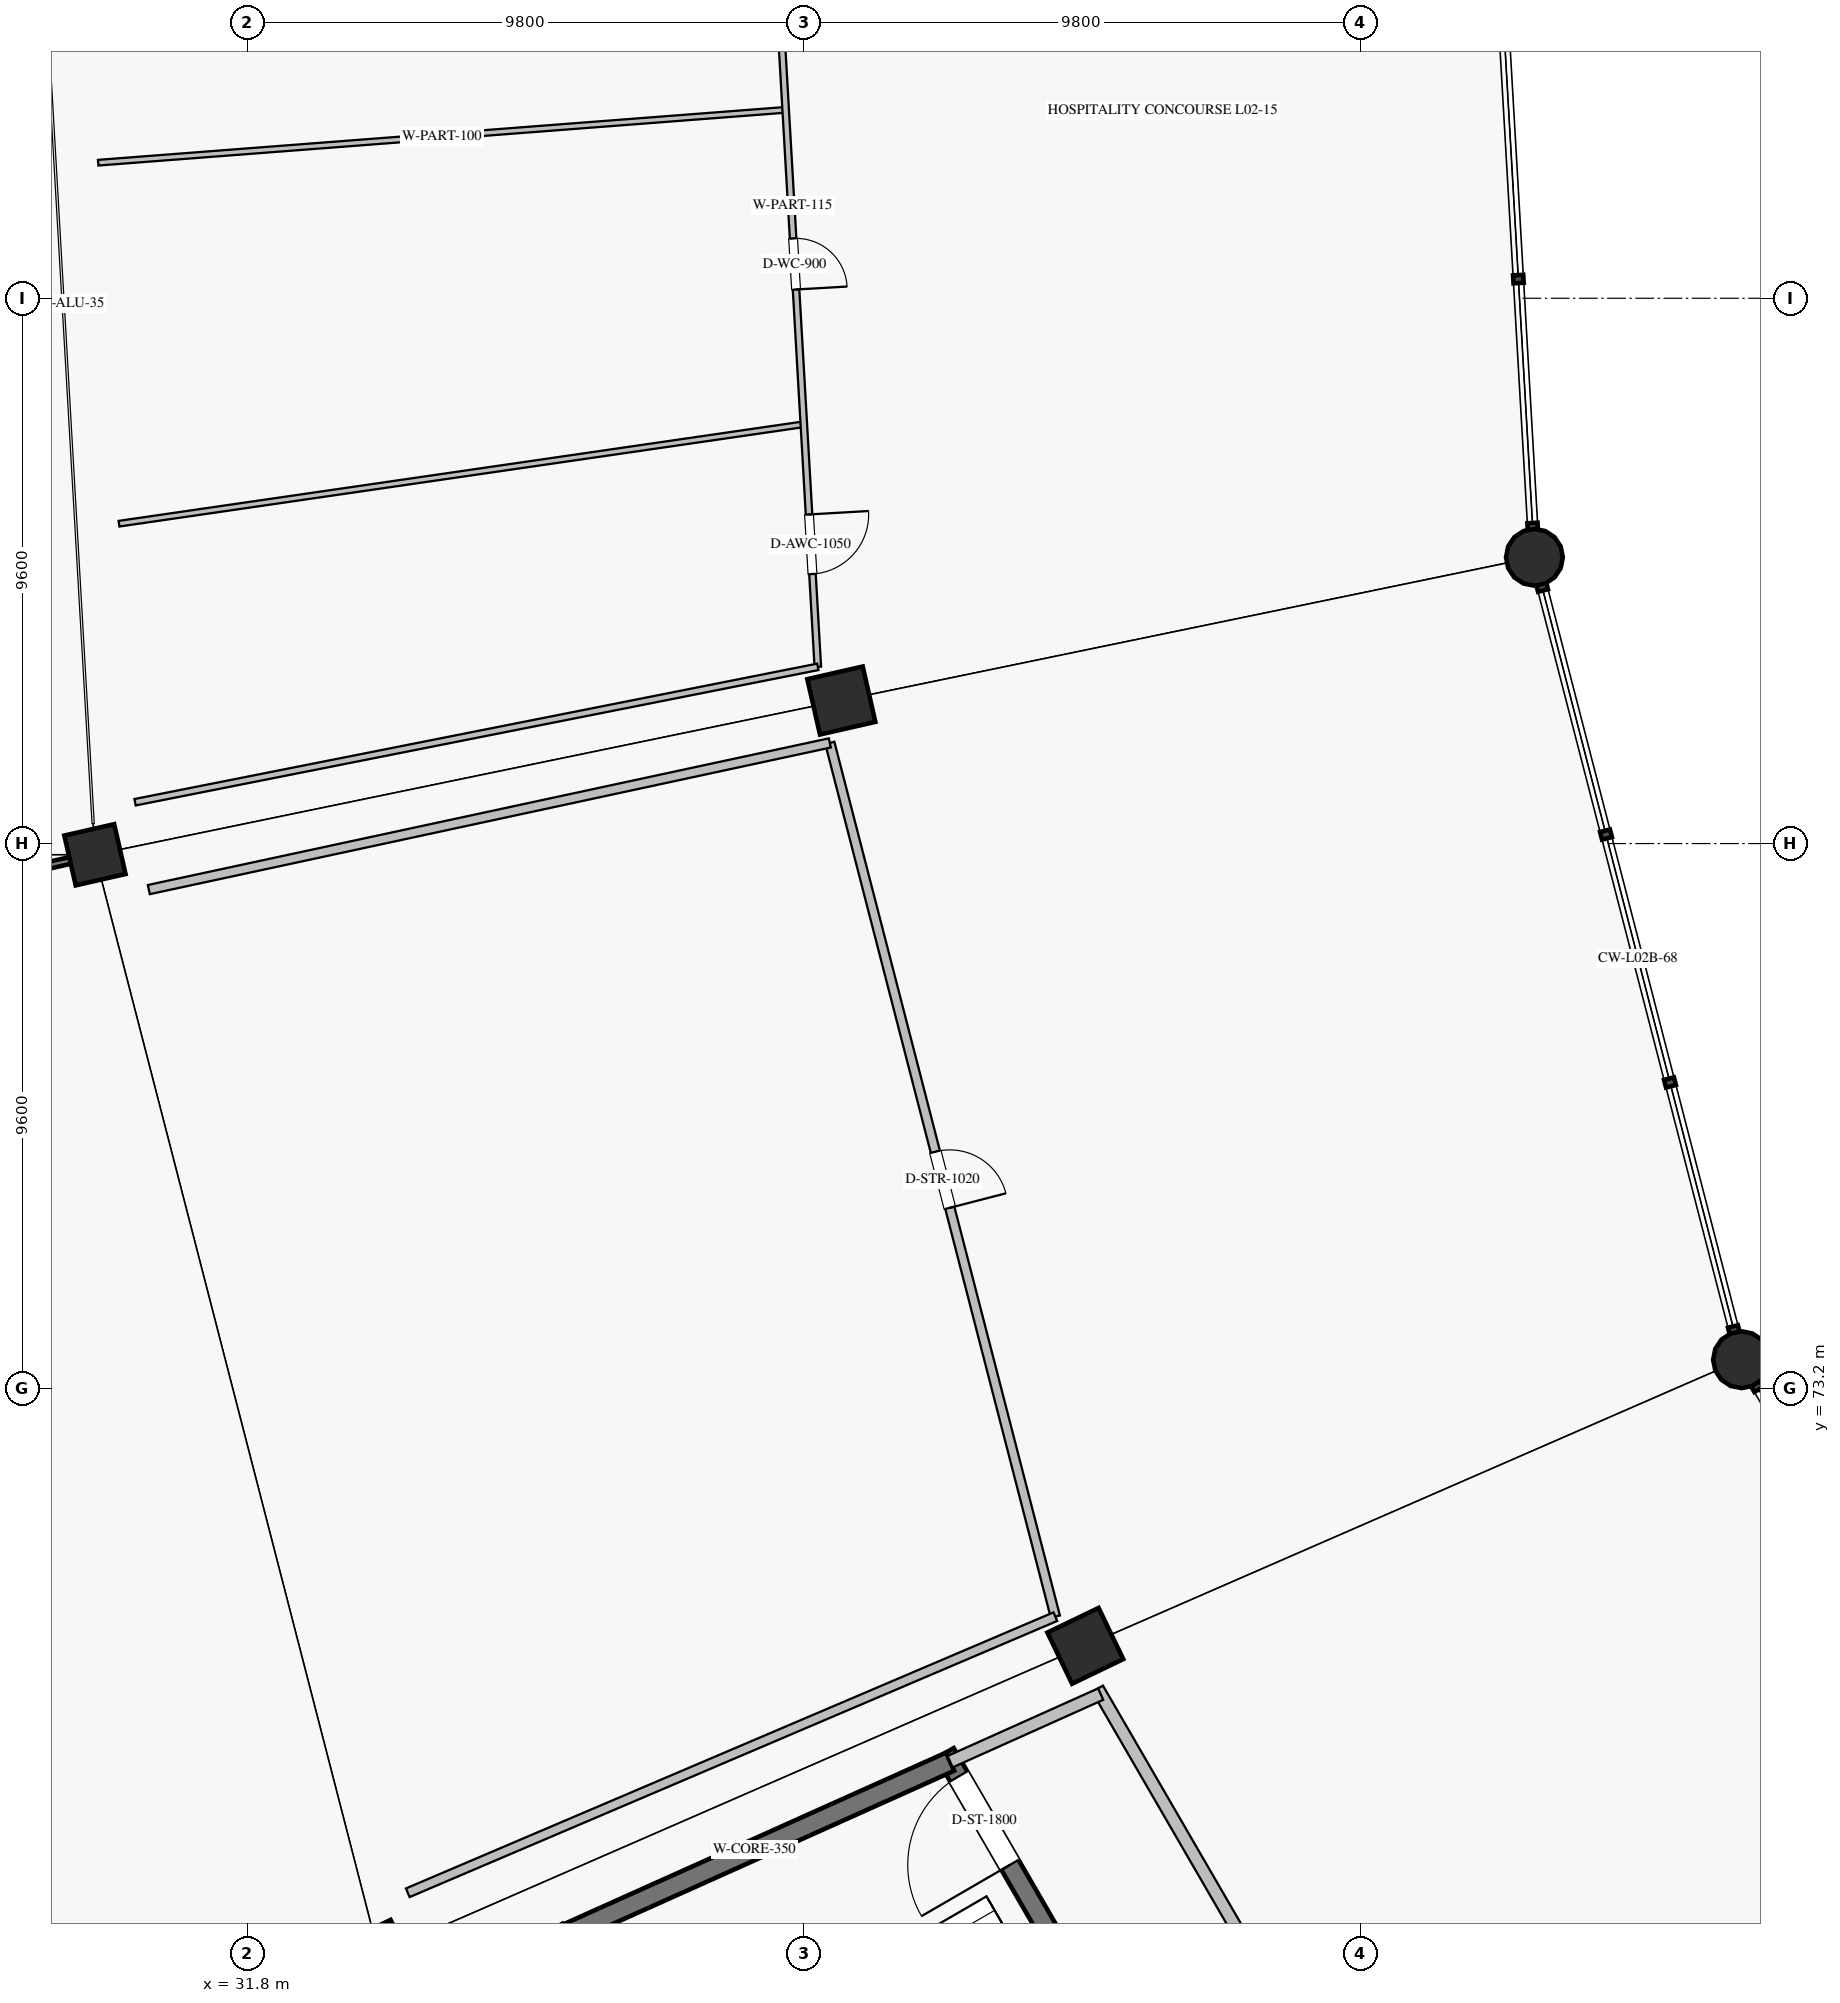
"""IFC4 building model, lengths in metres.
Left out: names, types, materials, properties, quantities, classifications, styles, units other than length and angle.
Written with IfcOpenShell. Run it as: python <this file> out.ifc"""

import sys

from ifc_helpers import new_model, si_unit, direction, frame, frame_2d, origin, origin_2d, place, context, subcontext, project, spatial, rectangle, circle, extrude, element, fill, save


model = new_model("IFC4")
c1 = context("Model", 3, precision=1e-05, world=origin(), true_north=direction((0.0, 1.0)))
c2 = subcontext(c1, "Body", "Model", "MODEL_VIEW")
j1 = project(units=[si_unit("LENGTHUNIT", "METRE"), si_unit("PLANEANGLEUNIT", "RADIAN")], contexts=[c1])
p1 = place(None, origin())
s1 = spatial("IfcSite", under=j1, at=p1, CompositionType="ELEMENT")
p2 = place(p1, origin())
s2 = spatial("IfcBuilding", under=s1, at=p2, CompositionType="ELEMENT")
p3 = place(p2, frame((0.0, 0.0, 10.54)))
s3 = spatial("IfcBuildingStorey", under=s2, at=p3, CompositionType="ELEMENT", Elevation=10.54)
for number, where, z_axis, x_axis in (
    (1, (54.467, 87.84, 0.0), (0.0, 0.0, 1.0), (-0.975, -0.223, 0.0)),
    (2, (58.114, 73.713, 0.0), (0.0, 0.0, 1.0), (-0.901, -0.434, 0.0)),
):
    element("IfcColumn", number, at=place(p3, frame(where, z_axis=z_axis, x_axis=x_axis)), inside=s3, PredefinedType="COLUMN", context=c2, shape_type="SweptSolid", body=[
        extrude(circle(Radius=0.5, at=origin_2d()), origin(), (0.0, 0.0, 1.0), 5.1),
    ])
for number, where, z_axis, x_axis in (
    (3, (42.262, 85.318, 0.0), (0.0, 0.0, 1.0), (-0.975, -0.223, 0.0)),
    (4, (46.559, 68.675, 0.0), (0.0, 0.0, 1.0), (-0.901, -0.434, 0.0)),
):
    element("IfcColumn", number, at=place(p3, frame(where, z_axis=z_axis, x_axis=x_axis)), inside=s3, PredefinedType="COLUMN", context=c2, shape_type="SweptSolid", body=[
        extrude(rectangle(XDim=1.0, YDim=1.0, at=origin_2d()), origin(), (0.0, 0.0, 1.0), 5.1),
    ])
for number, where, z_axis, x_axis in (
    (5, (29.119, 82.602, 0.0), (0.0, 0.0, 1.0), (-0.975, -0.223, 0.0)),
    (6, (34.115, 63.25, 0.0), (0.0, 0.0, 1.0), (-0.901, -0.434, 0.0)),
):
    element("IfcColumn", number, at=place(p3, frame(where, z_axis=z_axis, x_axis=x_axis)), inside=s3, PredefinedType="COLUMN", context=c2, shape_type="SweptSolid", body=[
        extrude(rectangle(XDim=0.9, YDim=0.9, at=origin_2d()), origin(), (0.0, 0.0, 1.0), 5.1),
    ])
p4 = place(p3, frame((44.09, 66.788, 0.0), z_axis=(0.0, 0.0, 1.0), x_axis=(0.501628624814, -0.865083072755, 0.0)))
e7 = element("IfcWall", 7, at=p4, inside=s3, PredefinedType="SHEAR", context=c2, shape_type="SweptSolid", body=[
    extrude(rectangle(XDim=11.435, YDim=0.35, at=frame_2d((5.718, 0.0))), origin(), (0.0, 0.0, 1.0), 4.84),
])
p5 = place(p4, frame((0.475, 0.0, 0.0)))
e8 = element("IfcOpeningElement", 8, at=p5, cuts=e7, PredefinedType="OPENING", context=c2, shape_type="SweptSolid", body=[
    extrude(rectangle(XDim=1.8, YDim=2.2, at=frame_2d((0.9, 1.1))), frame((0.0, 0.185, 0.0), z_axis=(0.0, -1.0, 0.0), x_axis=(1.0, 0.0, 0.0)), (0.0, 0.0, 1.0), 0.37),
])
p6 = place(p3, frame((44.178, 66.636, 0.0), z_axis=(0.0, 0.0, 1.0), x_axis=(-0.912385324524, -0.409332407212, 0.0)))
e9 = element("IfcWall", 9, at=p6, inside=s3, PredefinedType="SHEAR", context=c2, shape_type="SweptSolid", body=[
    extrude(rectangle(XDim=7.554, YDim=0.35, at=frame_2d((3.777, 0.0))), origin(), (0.0, 0.0, 1.0), 4.84),
])
p7 = place(p3, frame((46.774, 67.921, 0.0), z_axis=(0.0, 0.0, 1.0), x_axis=(0.501612626242, -0.865092349518, 0.0)))
e10 = element("IfcWall", 10, at=p7, inside=s3, PredefinedType="SOLIDWALL", context=c2, shape_type="SweptSolid", body=[
    extrude(rectangle(XDim=16.11, YDim=0.22, at=frame_2d((8.055, 0.0))), origin(), (0.0, 0.0, 1.0), 3.788),
])
p8 = place(p7, frame((6.511, 0.0, 0.0)))
e11 = element("IfcOpeningElement", 11, at=p8, cuts=e10, PredefinedType="OPENING", context=c2, shape_type="SweptSolid", body=[
    extrude(rectangle(XDim=1.5, YDim=2.2, at=frame_2d((0.75, 1.1))), frame((0.0, 0.12, 0.0), z_axis=(0.0, -1.0, 0.0), x_axis=(1.0, 0.0, 0.0)), (0.0, 0.0, 1.0), 0.24),
])
p9 = place(p3, frame((46.829, 67.826, 0.0), z_axis=(0.0, 0.0, 1.0), x_axis=(-0.912378422162, -0.409347791949, 0.0)))
e12 = element("IfcWall", 12, at=p9, inside=s3, PredefinedType="SOLIDWALL", context=c2, shape_type="SweptSolid", body=[
    extrude(rectangle(XDim=2.906, YDim=0.22, at=frame_2d((1.453, 0.0))), origin(), (0.0, 0.0, 1.0), 4.84),
])
p10 = place(p3, frame((40.959, 101.33, 0.0), z_axis=(0.0, 0.0, 1.0), x_axis=(0.057603503798, -0.998339539611, 0.0)))
e13 = element("IfcWall", 13, at=p10, inside=s3, PredefinedType="PARTITIONING", context=c2, shape_type="SweptSolid", body=[
    extrude(rectangle(XDim=15.444, YDim=0.115, at=frame_2d((7.722, 0.0))), origin(), (0.0, 0.0, 1.0), 4.16),
])
p11 = place(p10, frame((2.33, 0.0, 0.0)))
e14 = element("IfcOpeningElement", 14, at=p11, cuts=e13, PredefinedType="OPENING", context=c2, shape_type="SweptSolid", body=[
    extrude(rectangle(XDim=0.9, YDim=2.1, at=frame_2d((0.45, 1.05))), frame((0.0, 0.067, 0.0), z_axis=(0.0, -1.0, 0.0), x_axis=(1.0, 0.0, 0.0)), (0.0, 0.0, 1.0), 0.135),
])
p12 = place(p10, frame((7.89, 0.0, 0.0)))
e15 = element("IfcOpeningElement", 15, at=p12, cuts=e13, PredefinedType="OPENING", context=c2, shape_type="SweptSolid", body=[
    extrude(rectangle(XDim=0.9, YDim=2.1, at=frame_2d((0.45, 1.05))), frame((0.0, 0.067, 0.0), z_axis=(0.0, -1.0, 0.0), x_axis=(1.0, 0.0, 0.0)), (0.0, 0.0, 1.0), 0.135),
])
p13 = place(p10, frame((12.757, 0.0, 0.0)))
e16 = element("IfcOpeningElement", 16, at=p13, cuts=e13, PredefinedType="OPENING", context=c2, shape_type="SweptSolid", body=[
    extrude(rectangle(XDim=1.05, YDim=2.1, at=frame_2d((0.525, 1.05))), frame((0.0, 0.067, 0.0), z_axis=(0.0, -1.0, 0.0), x_axis=(1.0, 0.0, 0.0)), (0.0, 0.0, 1.0), 0.135),
])
p14 = place(p3, frame((41.848, 85.911, 0.0), z_axis=(0.0, 0.0, 1.0), x_axis=(-0.980904167784, -0.194491680088, 0.0)))
e17 = element("IfcWall", 17, at=p14, inside=s3, PredefinedType="PARTITIONING", context=c2, shape_type="SweptSolid", body=[
    extrude(rectangle(XDim=12.257, YDim=0.115, at=frame_2d((6.128, 0.0))), origin(), (0.0, 0.0, 1.0), 4.16),
])
p15 = place(p3, frame((41.282, 95.717, 0.0), z_axis=(0.0, 0.0, 1.0), x_axis=(-0.997058150978, -0.076648832789, 0.0)))
e18 = element("IfcWall", 18, at=p15, inside=s3, PredefinedType="PARTITIONING", context=c2, shape_type="SweptSolid", body=[
    extrude(rectangle(XDim=12.142, YDim=0.1, at=frame_2d((6.071, 0.0))), origin(), (0.0, 0.0, 1.0), 4.16),
])
p16 = place(p3, frame((41.602, 90.182, 0.0), z_axis=(0.0, 0.0, 1.0), x_axis=(-0.989621901332, -0.143695832939, 0.0)))
e19 = element("IfcWall", 19, at=p16, inside=s3, PredefinedType="PARTITIONING", context=c2, shape_type="SweptSolid", body=[
    extrude(rectangle(XDim=12.185, YDim=0.1, at=frame_2d((6.093, 0.0))), origin(), (0.0, 0.0, 1.0), 4.16),
])
p17 = place(p3, frame((42.06, 84.572, 0.0), z_axis=(0.0, 0.0, 1.0), x_axis=(0.249970043824, -0.968253570709, 0.0)))
e20 = element("IfcWall", 20, at=p17, inside=s3, PredefinedType="PARTITIONING", context=c2, shape_type="SweptSolid", body=[
    extrude(rectangle(XDim=15.887, YDim=0.165, at=frame_2d((7.943, 0.0))), origin(), (0.0, 0.0, 1.0), 4.16),
])
p18 = place(p17, frame((7.433, 0.0, 0.0)))
e21 = element("IfcOpeningElement", 21, at=p18, cuts=e20, PredefinedType="OPENING", context=c2, shape_type="SweptSolid", body=[
    extrude(rectangle(XDim=1.02, YDim=2.1, at=frame_2d((0.51, 1.05))), frame((0.0, 0.093, 0.0), z_axis=(0.0, -1.0, 0.0), x_axis=(1.0, 0.0, 0.0)), (0.0, 0.0, 1.0), 0.185),
])
p19 = place(p3, frame((42.06, 84.572, 0.0), z_axis=(0.0, 0.0, 1.0), x_axis=(-0.97759337709, -0.210502230558, 0.0)))
e22 = element("IfcWall", 22, at=p19, inside=s3, PredefinedType="PARTITIONING", context=c2, shape_type="SweptSolid", body=[
    extrude(rectangle(XDim=12.266, YDim=0.165, at=frame_2d((6.133, 0.0))), origin(), (0.0, 0.0, 1.0), 4.16),
])
p20 = place(p3, frame((46.031, 69.189, 0.0), z_axis=(0.0, 0.0, 1.0), x_axis=(-0.919905328402, -0.392140519173, 0.0)))
e23 = element("IfcWall", 23, at=p20, inside=s3, PredefinedType="PARTITIONING", context=c2, shape_type="SweptSolid", body=[
    extrude(rectangle(XDim=12.396, YDim=0.165, at=frame_2d((6.198, 0.0))), origin(), (0.0, 0.0, 1.0), 4.16),
])
p21 = place(p5, frame((1.8, 0.0, 0.0), z_axis=(0.0, 0.0, 1.0), x_axis=(-1.0, 0.0, 0.0)))
e24 = element("IfcDoor", 24, at=p21, inside=s3, OperationType="SINGLE_SWING_LEFT", PredefinedType="DOOR", context=c2, shape_type="SweptSolid", body=[
    extrude(rectangle(XDim=1.8, YDim=2.2, at=frame_2d((0.9, 1.1))), frame((0.0, 0.025, 0.0), z_axis=(0.0, -1.0, 0.0), x_axis=(1.0, 0.0, 0.0)), (0.0, 0.0, 1.0), 0.05),
])
fill(e8, e24)
p22 = place(p12, origin())
e25 = element("IfcDoor", 25, at=p22, inside=s3, OperationType="SINGLE_SWING_RIGHT", PredefinedType="DOOR", context=c2, shape_type="SweptSolid", body=[
    extrude(rectangle(XDim=0.9, YDim=2.1, at=frame_2d((0.45, 1.05))), frame((0.0, 0.025, 0.0), z_axis=(0.0, -1.0, 0.0), x_axis=(1.0, 0.0, 0.0)), (0.0, 0.0, 1.0), 0.05),
])
fill(e15, e25)
p23 = place(p13, origin())
e26 = element("IfcDoor", 26, at=p23, inside=s3, OperationType="SINGLE_SWING_LEFT", PredefinedType="DOOR", context=c2, shape_type="SweptSolid", body=[
    extrude(rectangle(XDim=1.05, YDim=2.1, at=frame_2d((0.525, 1.05))), frame((0.0, 0.025, 0.0), z_axis=(0.0, -1.0, 0.0), x_axis=(1.0, 0.0, 0.0)), (0.0, 0.0, 1.0), 0.05),
])
fill(e16, e26)
p24 = place(p18, origin())
e27 = element("IfcDoor", 27, at=p24, inside=s3, OperationType="SINGLE_SWING_RIGHT", PredefinedType="DOOR", context=c2, shape_type="SweptSolid", body=[
    extrude(rectangle(XDim=1.02, YDim=2.1, at=frame_2d((0.51, 1.05))), frame((0.0, 0.025, 0.0), z_axis=(0.0, -1.0, 0.0), x_axis=(1.0, 0.0, 0.0)), (0.0, 0.0, 1.0), 0.05),
])
fill(e21, e27)
save(model, sys.argv[1])
